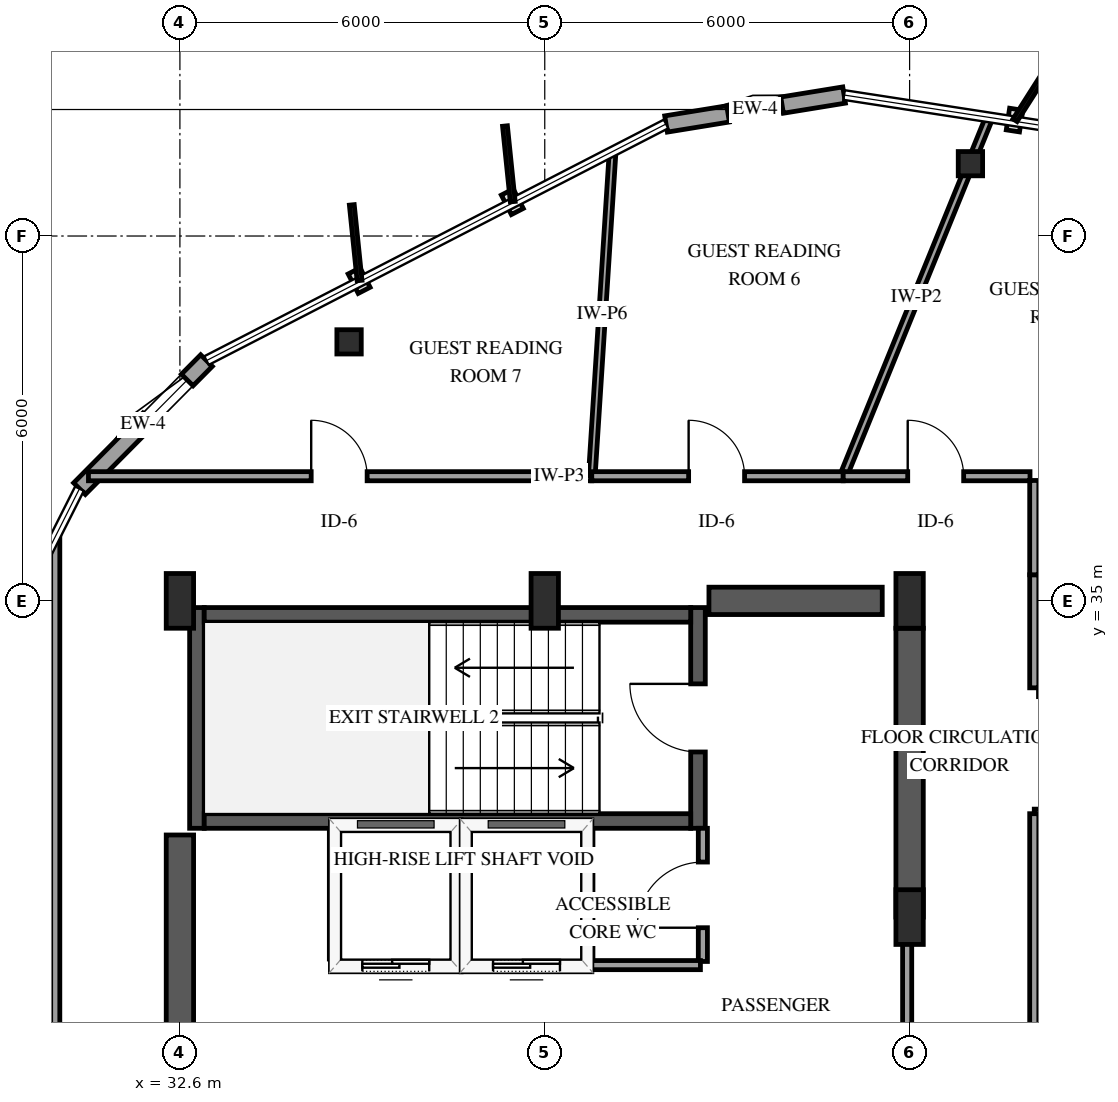
"""IFC4 building model, lengths in metres.
Left out: names, types, materials, properties, quantities, classifications, styles, units other than length and angle.
Written with IfcOpenShell. Run it as: python <this file> out.ifc"""

import sys

from ifc_helpers import new_model, si_unit, direction, frame, frame_2d, origin, origin_2d, place, context, subcontext, project, spatial, rectangle, i_section, extrude, element, fill, save


model = new_model("IFC4")
c1 = context("Model", 3, precision=1e-05, world=origin(), true_north=direction((0.0, 1.0)))
c2 = subcontext(c1, "Body", "Model", "MODEL_VIEW")
j1 = project(units=[si_unit("LENGTHUNIT", "METRE"), si_unit("PLANEANGLEUNIT", "RADIAN")], contexts=[c1])
p1 = place(None, origin())
s1 = spatial("IfcSite", under=j1, at=p1, CompositionType="ELEMENT")
p2 = place(p1, origin())
s2 = spatial("IfcBuilding", under=s1, at=p2, CompositionType="ELEMENT")
p3 = place(p2, frame((0.0, 0.0, 265.0)))
s3 = spatial("IfcBuildingStorey", under=s2, at=p3, CompositionType="ELEMENT", Elevation=265.0)
p4 = place(p3, frame((32.88, 31.26, 0.0), z_axis=(0.0, 0.0, 1.0), x_axis=(0.0, 1.0, 0.0)))
e1 = element("IfcWall", 1, at=p4, inside=s3, PredefinedType="SHEAR", context=c2, shape_type="SweptSolid", body=[
    extrude(rectangle(XDim=3.63, YDim=0.24, at=frame_2d((1.815, 0.0))), origin(), (0.0, 0.0, 1.0), 3.75),
])
p5 = place(p3, frame((41.12, 31.26, 0.0), z_axis=(0.0, 0.0, 1.0), x_axis=(0.0, 1.0, 0.0)))
e2 = element("IfcWall", 2, at=p5, inside=s3, PredefinedType="SHEAR", context=c2, shape_type="SweptSolid", body=[
    extrude(rectangle(XDim=3.63, YDim=0.24, at=frame_2d((1.815, 0.0))), origin(), (0.0, 0.0, 1.0), 3.75),
])
p6 = place(p5, frame((1.255, 0.0, 0.0)))
e3 = element("IfcOpeningElement", 3, at=p6, cuts=e2, PredefinedType="OPENING", context=c2, shape_type="SweptSolid", body=[
    extrude(rectangle(XDim=1.12, YDim=2.15, at=frame_2d((0.56, 1.075))), frame((0.0, 0.13, 0.0), z_axis=(0.0, -1.0, 0.0), x_axis=(1.0, 0.0, 0.0)), (0.0, 0.0, 1.0), 0.26),
])
for number, where, z_axis, x_axis in (
    (4, (33.0, 31.38, 0.0), (0.0, 0.0, 1.0), (1.0, 0.0, 0.0)),
    (5, (33.0, 34.77, 0.0), (0.0, 0.0, 1.0), (1.0, 0.0, 0.0)),
):
    element("IfcWall", number, at=place(p3, frame(where, z_axis=z_axis, x_axis=x_axis)), inside=s3, PredefinedType="SHEAR", context=c2, shape_type="SweptSolid", body=[
        extrude(rectangle(XDim=8.0, YDim=0.24, at=frame_2d((4.0, 0.0))), origin(), (0.0, 0.0, 1.0), 3.75),
    ])
p7 = place(p3, frame((32.6, 18.85, 0.0), z_axis=(0.0, 0.0, 1.0), x_axis=(0.0, 1.0, 0.0)))
e6 = element("IfcWall", 6, at=p7, inside=s3, PredefinedType="SHEAR", context=c2, shape_type="SweptSolid", body=[
    extrude(rectangle(XDim=12.3, YDim=0.45, at=frame_2d((6.15, 0.0))), origin(), (0.0, 0.0, 1.0), 3.75),
])
p8 = place(p3, frame((41.3, 35.0, 0.0), z_axis=(0.0, 0.0, 1.0), x_axis=(1.0, 0.0, 0.0)))
e7 = element("IfcWall", 7, at=p8, inside=s3, PredefinedType="SHEAR", context=c2, shape_type="SweptSolid", body=[
    extrude(rectangle(XDim=2.85, YDim=0.45, at=frame_2d((1.425, 0.0))), origin(), (0.0, 0.0, 1.0), 3.75),
])
p9 = place(p3, frame((44.6, 29.8, 0.0), z_axis=(0.0, 0.0, 1.0), x_axis=(0.0, 1.0, 0.0)))
e8 = element("IfcWall", 8, at=p9, inside=s3, PredefinedType="SHEAR", context=c2, shape_type="SweptSolid", body=[
    extrude(rectangle(XDim=4.75, YDim=0.45, at=frame_2d((2.375, 0.0))), origin(), (0.0, 0.0, 1.0), 3.75),
])
for number, where, z_axis, x_axis in (
    (9, (32.6, 35.0, 0.0), (0.0, 0.0, 1.0), (1.0, 0.0, 0.0)),
    (10, (38.6, 35.0, 0.0), (0.0, 0.0, 1.0), (1.0, 0.0, 0.0)),
    (11, (44.6, 29.8, 0.0), (0.0, 0.0, 1.0), (1.0, 0.0, 0.0)),
    (12, (44.6, 35.0, 0.0), (0.0, 0.0, 1.0), (1.0, 0.0, 0.0)),
):
    element("IfcColumn", number, at=place(p3, frame(where, z_axis=z_axis, x_axis=x_axis)), inside=s3, PredefinedType="PILASTER", context=c2, shape_type="SweptSolid", body=[
        extrude(rectangle(XDim=0.45, YDim=0.9, at=origin_2d()), origin(), (0.0, 0.0, 1.0), 3.75),
    ])
for number, where, z_axis, x_axis in (
    (13, (45.6, 42.189, 0.0), (0.0, 0.0, 1.0), (1.0, 0.0, 0.0)),
    (14, (35.382, 39.26, 0.0), (0.0, 0.0, 1.0), (1.0, 0.0, 0.0)),
):
    element("IfcColumn", number, at=place(p3, frame(where, z_axis=z_axis, x_axis=x_axis)), inside=s3, PredefinedType="COLUMN", context=c2, shape_type="SweptSolid", body=[
        extrude(i_section(OverallWidth=0.401, OverallDepth=0.399, WebThickness=0.025, FlangeThickness=0.04, FilletRadius=0.038, at=origin_2d()), origin(), (0.0, 0.0, 1.0), 3.75),
    ])
p10 = place(p3, frame((43.523, 43.319, 0.0), z_axis=(0.0, 0.0, 1.0), x_axis=(-0.98702699036, -0.16055441539, 0.0)))
e15 = element("IfcWall", 15, at=p10, inside=s3, PredefinedType="SOLIDWALL", context=c2, shape_type="SweptSolid", body=[
    extrude(rectangle(XDim=2.967, YDim=0.27, at=frame_2d((1.483, 0.0))), origin(), (0.0, 0.0, 1.0), 2.829),
])
p11 = place(p10, frame((1.033, 0.0, 0.75)))
e16 = element("IfcOpeningElement", 16, at=p11, cuts=e15, PredefinedType="OPENING", context=c2, shape_type="SweptSolid", body=[
    extrude(rectangle(XDim=0.9, YDim=1.5, at=frame_2d((0.45, 0.75))), frame((0.0, 0.145, 0.0), z_axis=(0.0, -1.0, 0.0), x_axis=(1.0, 0.0, 0.0)), (0.0, 0.0, 1.0), 0.29),
])
p12 = place(p3, frame((33.038, 38.952, 0.0), z_axis=(0.0, 0.0, 1.0), x_axis=(-0.704179352497, -0.71002214016, 0.0)))
e17 = element("IfcWall", 17, at=p12, inside=s3, PredefinedType="SOLIDWALL", context=c2, shape_type="SweptSolid", body=[
    extrude(rectangle(XDim=2.967, YDim=0.27, at=frame_2d((1.483, 0.0))), origin(), (0.0, 0.0, 1.0), 2.829),
])
p13 = place(p12, frame((0.45, 0.0, 0.75)))
e18 = element("IfcOpeningElement", 18, at=p13, cuts=e17, PredefinedType="OPENING", context=c2, shape_type="SweptSolid", body=[
    extrude(rectangle(XDim=0.9, YDim=1.5, at=frame_2d((0.45, 0.75))), frame((0.0, 0.145, 0.0), z_axis=(0.0, -1.0, 0.0), x_axis=(1.0, 0.0, 0.0)), (0.0, 0.0, 1.0), 0.29),
])
p14 = place(p3, frame((35.15, 29.0, 0.0), z_axis=(0.0, 0.0, 1.0), x_axis=(1.0, 0.0, 0.0)))
e19 = element("IfcWall", 19, at=p14, inside=s3, PredefinedType="SOLIDWALL", context=c2, shape_type="SweptSolid", body=[
    extrude(rectangle(XDim=2.0, YDim=0.185, at=frame_2d((1.0, 0.0))), origin(), (0.0, 0.0, 1.0), 3.45),
])
p15 = place(p14, frame((0.45, 0.0, 0.0)))
e20 = element("IfcOpeningElement", 20, at=p15, cuts=e19, PredefinedType="OPENING", context=c2, shape_type="SweptSolid", body=[
    extrude(rectangle(XDim=1.1, YDim=2.15, at=frame_2d((0.55, 1.075))), frame((0.0, 0.103, 0.0), z_axis=(0.0, -1.0, 0.0), x_axis=(1.0, 0.0, 0.0)), (0.0, 0.0, 1.0), 0.205),
])
for number, where, z_axis, x_axis in (
    (21, (35.15, 29.11, 0.0), (0.0, 0.0, 1.0), (0.0, 1.0, 0.0)),
    (22, (37.15, 29.11, 0.0), (0.0, 0.0, 1.0), (0.0, 1.0, 0.0)),
):
    element("IfcWall", number, at=place(p3, frame(where, z_axis=z_axis, x_axis=x_axis)), inside=s3, PredefinedType="SOLIDWALL", context=c2, shape_type="SweptSolid", body=[
        extrude(rectangle(XDim=2.1, YDim=0.185, at=frame_2d((1.05, 0.0))), origin(), (0.0, 0.0, 1.0), 3.45),
    ])
p16 = place(p3, frame((37.3, 29.0, 0.0), z_axis=(0.0, 0.0, 1.0), x_axis=(1.0, 0.0, 0.0)))
e23 = element("IfcWall", 23, at=p16, inside=s3, PredefinedType="SOLIDWALL", context=c2, shape_type="SweptSolid", body=[
    extrude(rectangle(XDim=2.0, YDim=0.185, at=frame_2d((1.0, 0.0))), origin(), (0.0, 0.0, 1.0), 3.45),
])
p17 = place(p16, frame((0.45, 0.0, 0.0)))
e24 = element("IfcOpeningElement", 24, at=p17, cuts=e23, PredefinedType="OPENING", context=c2, shape_type="SweptSolid", body=[
    extrude(rectangle(XDim=1.1, YDim=2.15, at=frame_2d((0.55, 1.075))), frame((0.0, 0.103, 0.0), z_axis=(0.0, -1.0, 0.0), x_axis=(1.0, 0.0, 0.0)), (0.0, 0.0, 1.0), 0.205),
])
p18 = place(p3, frame((39.3, 29.11, 0.0), z_axis=(0.0, 0.0, 1.0), x_axis=(0.0, 1.0, 0.0)))
e25 = element("IfcWall", 25, at=p18, inside=s3, PredefinedType="SOLIDWALL", context=c2, shape_type="SweptSolid", body=[
    extrude(rectangle(XDim=2.1, YDim=0.185, at=frame_2d((1.05, 0.0))), origin(), (0.0, 0.0, 1.0), 3.45),
])
p19 = place(p3, frame((46.65, 26.664, 0.0), z_axis=(0.0, 0.0, 1.0), x_axis=(0.97929058144, 0.202459766627, 0.0)))
e26 = element("IfcWall", 26, at=p19, inside=s3, PredefinedType="PARTITIONING", context=c2, shape_type="SweptSolid", body=[
    extrude(rectangle(XDim=15.998, YDim=0.1, at=frame_2d((7.999, 0.0))), origin(), (0.0, 0.0, 1.0), 2.745),
])
p20 = place(p3, frame((62.058, 31.5, 0.0), z_axis=(0.0, 0.0, 1.0), x_axis=(-1.0, 0.0, 0.0)))
e27 = element("IfcWall", 27, at=p20, inside=s3, PredefinedType="PARTITIONING", context=c2, shape_type="SweptSolid", body=[
    extrude(rectangle(XDim=15.408, YDim=0.15, at=frame_2d((7.704, 0.0))), origin(), (0.0, 0.0, 1.0), 2.824),
])
p21 = place(p20, frame((7.229, 0.0, 0.0)))
e28 = element("IfcOpeningElement", 28, at=p21, cuts=e27, PredefinedType="OPENING", context=c2, shape_type="SweptSolid", body=[
    extrude(rectangle(XDim=0.92, YDim=2.12, at=frame_2d((0.46, 1.06))), frame((0.0, 0.085, 0.0), z_axis=(0.0, -1.0, 0.0), x_axis=(1.0, 0.0, 0.0)), (0.0, 0.0, 1.0), 0.17),
])
p22 = place(p3, frame((30.55, 25.185, 0.0), z_axis=(0.0, 0.0, 1.0), x_axis=(0.0, 1.0, 0.0)))
e29 = element("IfcWall", 29, at=p22, inside=s3, PredefinedType="PARTITIONING", context=c2, shape_type="SweptSolid", body=[
    extrude(rectangle(XDim=10.87, YDim=0.15, at=frame_2d((5.435, 0.0))), origin(), (0.0, 0.0, 1.0), 3.45),
])
p23 = place(p22, frame((1.155, 0.0, 0.0)))
e30 = element("IfcOpeningElement", 30, at=p23, cuts=e29, PredefinedType="OPENING", context=c2, shape_type="SweptSolid", body=[
    extrude(rectangle(XDim=0.92, YDim=2.12, at=frame_2d((0.46, 1.06))), frame((0.0, 0.085, 0.0), z_axis=(0.0, -1.0, 0.0), x_axis=(1.0, 0.0, 0.0)), (0.0, 0.0, 1.0), 0.17),
])
p24 = place(p3, frame((46.65, 35.429, 0.0), z_axis=(0.0, 0.0, 1.0), x_axis=(0.611113468405, 0.791543004981, 0.0)))
e31 = element("IfcWall", 31, at=p24, inside=s3, PredefinedType="PARTITIONING", context=c2, shape_type="SweptSolid", body=[
    extrude(rectangle(XDim=8.364, YDim=0.11, at=frame_2d((4.182, 0.0))), origin(), (0.0, 0.0, 1.0), 2.828),
])
p25 = place(p3, frame((31.096, 37.05, 0.0), z_axis=(0.0, 0.0, 1.0), x_axis=(1.0, 0.0, 0.0)))
e32 = element("IfcWall", 32, at=p25, inside=s3, PredefinedType="PARTITIONING", context=c2, shape_type="SweptSolid", body=[
    extrude(rectangle(XDim=8.277, YDim=0.15, at=frame_2d((4.139, 0.0))), origin(), (0.0, 0.0, 1.0), 3.45),
])
p26 = place(p25, frame((3.663, 0.0, 0.0)))
e33 = element("IfcOpeningElement", 33, at=p26, cuts=e32, PredefinedType="OPENING", context=c2, shape_type="SweptSolid", body=[
    extrude(rectangle(XDim=0.92, YDim=2.12, at=frame_2d((0.46, 1.06))), frame((0.0, 0.085, 0.0), z_axis=(0.0, -1.0, 0.0), x_axis=(1.0, 0.0, 0.0)), (0.0, 0.0, 1.0), 0.17),
])
p27 = place(p3, frame((44.56, 29.8, 0.0), z_axis=(0.0, 0.0, 1.0), x_axis=(0.0, -1.0, 0.0)))
e34 = element("IfcWall", 34, at=p27, inside=s3, PredefinedType="PARTITIONING", context=c2, shape_type="SweptSolid", body=[
    extrude(rectangle(XDim=6.91, YDim=0.15, at=frame_2d((3.455, 0.0))), origin(), (0.0, 0.0, 1.0), 2.49),
])
p28 = place(p27, frame((2.915, 0.0, 0.0)))
e35 = element("IfcOpeningElement", 35, at=p28, cuts=e34, PredefinedType="OPENING", context=c2, shape_type="SweptSolid", body=[
    extrude(rectangle(XDim=1.08, YDim=2.15, at=frame_2d((0.54, 1.075))), frame((0.0, 0.085, 0.0), z_axis=(0.0, -1.0, 0.0), x_axis=(1.0, 0.0, 0.0)), (0.0, 0.0, 1.0), 0.17),
])
p29 = place(p3, frame((43.508, 37.05, 0.0), z_axis=(0.0, 0.0, 1.0), x_axis=(0.377131345073, 0.926159785654, 0.0)))
e36 = element("IfcWall", 36, at=p29, inside=s3, PredefinedType="PARTITIONING", context=c2, shape_type="SweptSolid", body=[
    extrude(rectangle(XDim=6.371, YDim=0.12, at=frame_2d((3.186, 0.0))), origin(), (0.0, 0.0, 1.0), 2.745),
])
p30 = place(p3, frame((39.373, 37.05, 0.0), z_axis=(0.0, 0.0, 1.0), x_axis=(0.064105254011, 0.997943142873, 0.0)))
e37 = element("IfcWall", 37, at=p30, inside=s3, PredefinedType="PARTITIONING", context=c2, shape_type="SweptSolid", body=[
    extrude(rectangle(XDim=5.351, YDim=0.11, at=frame_2d((2.675, 0.0))), origin(), (0.0, 0.0, 1.0), 3.45),
])
p31 = place(p3, frame((46.65, 31.5, 0.0), z_axis=(0.0, 0.0, 1.0), x_axis=(0.0, -1.0, 0.0)))
e38 = element("IfcWall", 38, at=p31, inside=s3, PredefinedType="PARTITIONING", context=c2, shape_type="SweptSolid", body=[
    extrude(rectangle(XDim=4.836, YDim=0.15, at=frame_2d((2.418, 0.0))), origin(), (0.0, 0.0, 1.0), 3.45),
])
p32 = place(p3, frame((39.373, 37.05, 0.0), z_axis=(0.0, 0.0, 1.0), x_axis=(1.0, 0.0, 0.0)))
e39 = element("IfcWall", 39, at=p32, inside=s3, PredefinedType="PARTITIONING", context=c2, shape_type="SweptSolid", body=[
    extrude(rectangle(XDim=4.135, YDim=0.15, at=frame_2d((2.067, 0.0))), origin(), (0.0, 0.0, 1.0), 3.45),
])
p33 = place(p32, frame((1.593, 0.0, 0.0)))
e40 = element("IfcOpeningElement", 40, at=p33, cuts=e39, PredefinedType="OPENING", context=c2, shape_type="SweptSolid", body=[
    extrude(rectangle(XDim=0.92, YDim=2.12, at=frame_2d((0.46, 1.06))), frame((0.0, 0.085, 0.0), z_axis=(0.0, -1.0, 0.0), x_axis=(1.0, 0.0, 0.0)), (0.0, 0.0, 1.0), 0.17),
])
p34 = place(p3, frame((43.508, 37.05, 0.0), z_axis=(0.0, 0.0, 1.0), x_axis=(1.0, 0.0, 0.0)))
e41 = element("IfcWall", 41, at=p34, inside=s3, PredefinedType="PARTITIONING", context=c2, shape_type="SweptSolid", body=[
    extrude(rectangle(XDim=3.072, YDim=0.15, at=frame_2d((1.536, 0.0))), origin(), (0.0, 0.0, 1.0), 3.45),
])
p35 = place(p34, frame((1.061, 0.0, 0.0)))
e42 = element("IfcOpeningElement", 42, at=p35, cuts=e41, PredefinedType="OPENING", context=c2, shape_type="SweptSolid", body=[
    extrude(rectangle(XDim=0.92, YDim=2.12, at=frame_2d((0.46, 1.06))), frame((0.0, 0.085, 0.0), z_axis=(0.0, -1.0, 0.0), x_axis=(1.0, 0.0, 0.0)), (0.0, 0.0, 1.0), 0.17),
])
p36 = place(p3, frame((46.72, 33.5, 0.0), z_axis=(0.0, 0.0, 1.0), x_axis=(1.0, 0.0, 0.0)))
e43 = element("IfcWall", 43, at=p36, inside=s3, PredefinedType="PARTITIONING", context=c2, shape_type="SweptSolid", body=[
    extrude(rectangle(XDim=2.534, YDim=0.15, at=frame_2d((1.267, 0.0))), origin(), (0.0, 0.0, 1.0), 3.45),
])
p37 = place(p36, frame((0.792, 0.0, 0.0)))
e44 = element("IfcOpeningElement", 44, at=p37, cuts=e43, PredefinedType="OPENING", context=c2, shape_type="SweptSolid", body=[
    extrude(rectangle(XDim=0.92, YDim=2.12, at=frame_2d((0.46, 1.06))), frame((0.0, 0.085, 0.0), z_axis=(0.0, -1.0, 0.0), x_axis=(1.0, 0.0, 0.0)), (0.0, 0.0, 1.0), 0.17),
])
p38 = place(p3, frame((41.2, 29.07, 0.0), z_axis=(0.0, 0.0, 1.0), x_axis=(0.0, 1.0, 0.0)))
e45 = element("IfcWall", 45, at=p38, inside=s3, PredefinedType="PARTITIONING", context=c2, shape_type="SweptSolid", body=[
    extrude(rectangle(XDim=2.19, YDim=0.15, at=frame_2d((1.095, 0.0))), origin(), (0.0, 0.0, 1.0), 3.45),
])
p39 = place(p38, frame((0.555, 0.0, 0.0)))
e46 = element("IfcOpeningElement", 46, at=p39, cuts=e45, PredefinedType="OPENING", context=c2, shape_type="SweptSolid", body=[
    extrude(rectangle(XDim=1.08, YDim=2.15, at=frame_2d((0.54, 1.075))), frame((0.0, 0.085, 0.0), z_axis=(0.0, -1.0, 0.0), x_axis=(1.0, 0.0, 0.0)), (0.0, 0.0, 1.0), 0.17),
])
p40 = place(p3, frame((39.3, 29.01, 0.0), z_axis=(0.0, 0.0, 1.0), x_axis=(1.0, 0.0, 0.0)))
e47 = element("IfcWall", 47, at=p40, inside=s3, PredefinedType="PARTITIONING", context=c2, shape_type="SweptSolid", body=[
    extrude(rectangle(XDim=1.86, YDim=0.15, at=frame_2d((0.93, 0.0))), origin(), (0.0, 0.0, 1.0), 3.45),
])
p41 = place(p3, frame((46.65, 35.429, 0.0), z_axis=(0.0, 0.0, 1.0), x_axis=(0.0, -1.0, 0.0)))
e48 = element("IfcWall", 48, at=p41, inside=s3, PredefinedType="PARTITIONING", context=c2, shape_type="SweptSolid", body=[
    extrude(rectangle(XDim=1.859, YDim=0.15, at=frame_2d((0.929, 0.0))), origin(), (0.0, 0.0, 1.0), 3.45),
])
p42 = place(p3, frame((46.65, 36.98, 0.0), z_axis=(0.0, 0.0, 1.0), x_axis=(0.0, -1.0, 0.0)))
e49 = element("IfcWall", 49, at=p42, inside=s3, PredefinedType="PARTITIONING", context=c2, shape_type="SweptSolid", body=[
    extrude(rectangle(XDim=1.551, YDim=0.15, at=frame_2d((0.775, 0.0))), origin(), (0.0, 0.0, 1.0), 3.45),
])
p43 = place(p11, origin())
e50 = element("IfcWindow", 50, at=p43, inside=s3, PartitioningType="SINGLE_PANEL", PredefinedType="WINDOW", context=c2, shape_type="SweptSolid", body=[
    extrude(rectangle(XDim=0.9, YDim=1.5, at=frame_2d((0.45, 0.75))), frame((0.0, 0.03, 0.0), z_axis=(0.0, -1.0, 0.0), x_axis=(1.0, 0.0, 0.0)), (0.0, 0.0, 1.0), 0.06),
])
fill(e16, e50)
p44 = place(p13, origin())
e51 = element("IfcWindow", 51, at=p44, inside=s3, PartitioningType="SINGLE_PANEL", PredefinedType="WINDOW", context=c2, shape_type="SweptSolid", body=[
    extrude(rectangle(XDim=0.9, YDim=1.5, at=frame_2d((0.45, 0.75))), frame((0.0, 0.03, 0.0), z_axis=(0.0, -1.0, 0.0), x_axis=(1.0, 0.0, 0.0)), (0.0, 0.0, 1.0), 0.06),
])
fill(e18, e51)
p45 = place(p15, origin())
e52 = element("IfcDoor", 52, at=p45, inside=s3, OperationType="SLIDING_TO_LEFT", PredefinedType="DOOR", context=c2, shape_type="SweptSolid", body=[
    extrude(rectangle(XDim=1.1, YDim=2.15, at=frame_2d((0.55, 1.075))), frame((0.0, 0.025, 0.0), z_axis=(0.0, -1.0, 0.0), x_axis=(1.0, 0.0, 0.0)), (0.0, 0.0, 1.0), 0.05),
])
fill(e20, e52)
p46 = place(p17, origin())
e53 = element("IfcDoor", 53, at=p46, inside=s3, OperationType="SLIDING_TO_LEFT", PredefinedType="DOOR", context=c2, shape_type="SweptSolid", body=[
    extrude(rectangle(XDim=1.1, YDim=2.15, at=frame_2d((0.55, 1.075))), frame((0.0, 0.025, 0.0), z_axis=(0.0, -1.0, 0.0), x_axis=(1.0, 0.0, 0.0)), (0.0, 0.0, 1.0), 0.05),
])
fill(e24, e53)
p47 = place(p6, origin())
e54 = element("IfcDoor", 54, at=p47, inside=s3, OperationType="SINGLE_SWING_RIGHT", PredefinedType="DOOR", context=c2, shape_type="SweptSolid", body=[
    extrude(rectangle(XDim=1.12, YDim=2.15, at=frame_2d((0.56, 1.075))), frame((0.0, 0.025, 0.0), z_axis=(0.0, -1.0, 0.0), x_axis=(1.0, 0.0, 0.0)), (0.0, 0.0, 1.0), 0.05),
])
fill(e3, e54)
p48 = place(p26, origin())
e55 = element("IfcDoor", 55, at=p48, inside=s3, OperationType="SINGLE_SWING_LEFT", PredefinedType="DOOR", context=c2, shape_type="SweptSolid", body=[
    extrude(rectangle(XDim=0.92, YDim=2.12, at=frame_2d((0.46, 1.06))), frame((0.0, 0.025, 0.0), z_axis=(0.0, -1.0, 0.0), x_axis=(1.0, 0.0, 0.0)), (0.0, 0.0, 1.0), 0.05),
])
fill(e33, e55)
p49 = place(p33, origin())
e56 = element("IfcDoor", 56, at=p49, inside=s3, OperationType="SINGLE_SWING_LEFT", PredefinedType="DOOR", context=c2, shape_type="SweptSolid", body=[
    extrude(rectangle(XDim=0.92, YDim=2.12, at=frame_2d((0.46, 1.06))), frame((0.0, 0.025, 0.0), z_axis=(0.0, -1.0, 0.0), x_axis=(1.0, 0.0, 0.0)), (0.0, 0.0, 1.0), 0.05),
])
fill(e40, e56)
p50 = place(p35, origin())
e57 = element("IfcDoor", 57, at=p50, inside=s3, OperationType="SINGLE_SWING_LEFT", PredefinedType="DOOR", context=c2, shape_type="SweptSolid", body=[
    extrude(rectangle(XDim=0.92, YDim=2.12, at=frame_2d((0.46, 1.06))), frame((0.0, 0.025, 0.0), z_axis=(0.0, -1.0, 0.0), x_axis=(1.0, 0.0, 0.0)), (0.0, 0.0, 1.0), 0.05),
])
fill(e42, e57)
p51 = place(p39, origin())
e58 = element("IfcDoor", 58, at=p51, inside=s3, OperationType="SINGLE_SWING_LEFT", PredefinedType="DOOR", context=c2, shape_type="SweptSolid", body=[
    extrude(rectangle(XDim=1.08, YDim=2.15, at=frame_2d((0.54, 1.075))), frame((0.0, 0.025, 0.0), z_axis=(0.0, -1.0, 0.0), x_axis=(1.0, 0.0, 0.0)), (0.0, 0.0, 1.0), 0.05),
])
fill(e46, e58)
save(model, sys.argv[1])
